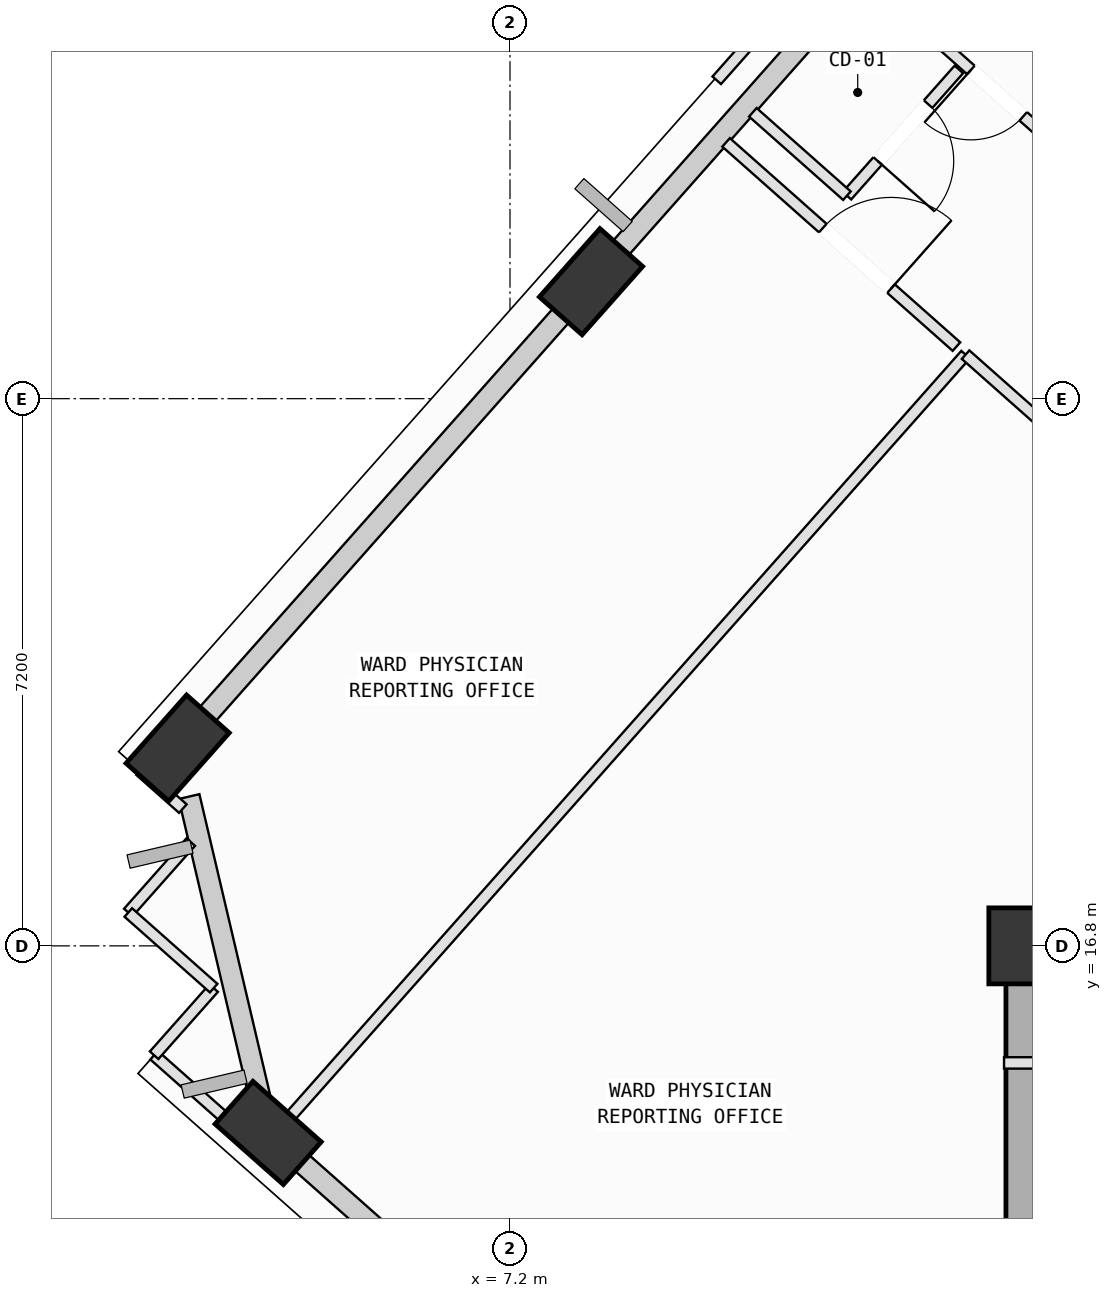
"""IFC4 building model, lengths in metres.
Left out: names, types, materials, properties, quantities, classifications, styles, units other than length and angle.
Written with IfcOpenShell. Run it as: python <this file> out.ifc"""

import sys

from ifc_helpers import new_model, si_unit, direction, frame, frame_2d, origin, origin_2d, place, context, subcontext, project, spatial, rectangle, extrude, element, fill, save


model = new_model("IFC4")
c1 = context("Model", 3, precision=1e-05, world=origin(), true_north=direction((0.0, 1.0)))
c2 = subcontext(c1, "Body", "Model", "MODEL_VIEW")
j1 = project(units=[si_unit("LENGTHUNIT", "METRE"), si_unit("PLANEANGLEUNIT", "RADIAN")], contexts=[c1])
p1 = place(None, origin())
s1 = spatial("IfcSite", under=j1, at=p1, CompositionType="ELEMENT")
p2 = place(p1, origin())
s2 = spatial("IfcBuilding", under=s1, at=p2, CompositionType="ELEMENT")
p3 = place(p2, frame((0.0, 0.0, 231.2)))
s3 = spatial("IfcBuildingStorey", under=s2, at=p3, CompositionType="ELEMENT", Elevation=231.2)
p4 = place(p3, frame((14.0, 16.8, 0.0), z_axis=(0.0, 0.0, 1.0), x_axis=(1.0, 0.0, 0.0)))
e1 = element("IfcColumn", 1, at=p4, inside=s3, PredefinedType="COLUMN", context=c2, shape_type="SweptSolid", body=[
    extrude(rectangle(XDim=1.0, YDim=1.0, at=origin_2d()), origin(), (0.0, 0.0, 1.0), 4.0),
])
p5 = place(p3, frame((8.266, 25.539, 0.002), z_axis=(-0.002187246162, -0.104441004248, 0.994528678614), x_axis=(0.678711632821, 0.73023191979, 0.078178403623)))
e2 = element("IfcColumn", 2, at=p5, inside=s3, PredefinedType="COLUMN", context=c2, shape_type="SweptSolid", body=[
    extrude(rectangle(XDim=1.2, YDim=0.75, at=origin_2d()), origin(), (0.0, 0.0, 1.0), 4.018),
])
p6 = place(p3, frame((2.827, 19.403, 0.002), z_axis=(0.023204107697, -0.126320011874, 0.991718117202), x_axis=(0.518268759348, 0.84979942688, 0.096116737138)))
e3 = element("IfcColumn", 3, at=p6, inside=s3, PredefinedType="COLUMN", context=c2, shape_type="SweptSolid", body=[
    extrude(rectangle(XDim=1.2, YDim=0.75, at=origin_2d()), origin(), (0.0, 0.0, 1.0), 4.03),
])
p7 = place(p3, frame((4.018, 14.339, 0.002), z_axis=(0.044042273811, -0.121222269459, 0.991647840468), x_axis=(-0.92799403017, 0.36264171227, 0.085545709951)))
e4 = element("IfcColumn", 4, at=p7, inside=s3, PredefinedType="COLUMN", context=c2, shape_type="SweptSolid", body=[
    extrude(rectangle(XDim=1.2, YDim=0.75, at=origin_2d()), origin(), (0.0, 0.0, 1.0), 4.03),
])
p8 = place(p3, frame((8.407, 25.699, 0.0), z_axis=(0.0, 0.0, 1.0), x_axis=(0.66326446151, 0.748385097458, 0.0)))
e5 = element("IfcWall", 5, at=p8, inside=s3, PredefinedType="SOLIDWALL", context=c2, shape_type="SweptSolid", body=[
    extrude(rectangle(XDim=7.434, YDim=0.28, at=frame_2d((3.717, 0.0))), origin(), (0.0, 0.0, 1.0), 3.265),
])
p9 = place(p3, frame((2.948, 19.539, 0.0), z_axis=(0.0, 0.0, 1.0), x_axis=(0.663273885077, 0.748376745614, 0.0)))
e6 = element("IfcWall", 6, at=p9, inside=s3, PredefinedType="SOLIDWALL", context=c2, shape_type="SweptSolid", body=[
    extrude(rectangle(XDim=7.485, YDim=0.28, at=frame_2d((3.742, 0.0))), origin(), (0.0, 0.0, 1.0), 3.265),
])
p10 = place(p3, frame((3.986, 14.473, 0.0), z_axis=(0.0, 0.0, 1.0), x_axis=(-0.228854104953, 0.973460732976, 0.0)))
e7 = element("IfcWall", 7, at=p10, inside=s3, PredefinedType="SOLIDWALL", context=c2, shape_type="SweptSolid", body=[
    extrude(rectangle(XDim=4.408, YDim=0.28, at=frame_2d((2.204, 0.0))), origin(), (0.0, 0.0, 1.0), 3.265),
])
p11 = place(p3, frame((8.835, 10.07, 0.0), z_axis=(0.0, 0.0, 1.0), x_axis=(-0.748388035146, 0.663261146797, 0.0)))
e8 = element("IfcWall", 8, at=p11, inside=s3, PredefinedType="SOLIDWALL", context=c2, shape_type="SweptSolid", body=[
    extrude(rectangle(XDim=5.831, YDim=0.28, at=frame_2d((2.915, 0.0))), origin(), (0.0, 0.0, 1.0), 3.265),
])
p12 = place(p11, frame((2.011, 0.0, 0.75)))
e9 = element("IfcOpeningElement", 9, at=p12, cuts=e8, PredefinedType="OPENING", context=c2, shape_type="SweptSolid", body=[
    extrude(rectangle(XDim=1.8, YDim=2.05, at=frame_2d((0.9, 1.025))), frame((0.0, 0.15, 0.0), z_axis=(0.0, -1.0, 0.0), x_axis=(1.0, 0.0, 0.0)), (0.0, 0.0, 1.0), 0.3),
])
p13 = place(p3, frame((14.0, 16.8, 0.0), z_axis=(0.0, 0.0, 1.0), x_axis=(0.0, -1.0, 0.0)))
e10 = element("IfcWall", 10, at=p13, inside=s3, PredefinedType="SHEAR", context=c2, shape_type="SweptSolid", body=[
    extrude(rectangle(XDim=9.0, YDim=0.55, at=frame_2d((4.5, 0.0))), origin(), (0.0, 0.0, 1.0), 3.78),
])
p14 = place(p3, frame((14.82, 15.26, 0.0), z_axis=(0.0, 0.0, 1.0), x_axis=(-1.0, 0.0, 0.0)))
e11 = element("IfcWall", 11, at=p14, inside=s3, PredefinedType="PARTITIONING", context=c2, shape_type="SweptSolid", body=[
    extrude(rectangle(XDim=1.12, YDim=0.15, at=frame_2d((0.56, 0.0))), origin(), (0.0, 0.0, 1.0), 3.78),
])
p15 = place(p3, frame((4.319, 13.764, 0.0), z_axis=(0.0, 0.0, 1.0), x_axis=(-0.748269298585, 0.663395098561, 0.0)))
e12 = element("IfcWall", 12, at=p15, inside=s3, PredefinedType="PARTITIONING", context=c2, shape_type="SweptSolid", body=[
    extrude(rectangle(XDim=0.532, YDim=0.15, at=frame_2d((0.266, 0.0))), origin(), (0.0, 0.0, 1.0), 3.265),
])
p16 = place(p3, frame((3.921, 14.117, 0.0), z_axis=(0.0, 0.0, 1.0), x_axis=(0.663304180291, 0.748349894374, 0.0)))
e13 = element("IfcWall", 13, at=p16, inside=s3, PredefinedType="PARTITIONING", context=c2, shape_type="SweptSolid", body=[
    extrude(rectangle(XDim=13.98, YDim=0.15, at=frame_2d((6.99, 0.0))), origin(), (0.0, 0.0, 1.0), 3.78),
])
p17 = place(p3, frame((13.194, 24.579, 0.0), z_axis=(0.0, 0.0, 1.0), x_axis=(0.748364755265, -0.663287413627, 0.0)))
e14 = element("IfcWall", 14, at=p17, inside=s3, PredefinedType="PARTITIONING", context=c2, shape_type="SweptSolid", body=[
    extrude(rectangle(XDim=6.029, YDim=0.15, at=frame_2d((3.015, 0.0))), origin(), (0.0, 0.0, 1.0), 3.78),
])
p18 = place(p17, frame((2.415, 0.0, 0.0)))
e15 = element("IfcOpeningElement", 15, at=p18, cuts=e14, PredefinedType="OPENING", context=c2, shape_type="SweptSolid", body=[
    extrude(rectangle(XDim=1.2, YDim=2.15, at=frame_2d((0.6, 1.075))), frame((0.0, 0.085, 0.0), z_axis=(0.0, -1.0, 0.0), x_axis=(1.0, 0.0, 0.0)), (0.0, 0.0, 1.0), 0.17),
])
p19 = place(p3, frame((2.178, 17.239, 0.0), z_axis=(0.0, 0.0, 1.0), x_axis=(0.663470520183, 0.748202425048, 0.0)))
e16 = element("IfcWall", 16, at=p19, inside=s3, PredefinedType="PARTITIONING", context=c2, shape_type="SweptSolid", body=[
    extrude(rectangle(XDim=1.239, YDim=0.15, at=frame_2d((0.62, 0.0))), origin(), (0.0, 0.0, 1.0), 3.78),
])
p20 = place(p3, frame((2.896, 18.606, 0.0), z_axis=(0.0, 0.0, 1.0), x_axis=(-0.747840076789, 0.663878919343, 0.0)))
e17 = element("IfcWall", 17, at=p20, inside=s3, PredefinedType="PARTITIONING", context=c2, shape_type="SweptSolid", body=[
    extrude(rectangle(XDim=0.75, YDim=0.15, at=frame_2d((0.375, 0.0))), origin(), (0.0, 0.0, 1.0), 3.78),
])
p21 = place(p3, frame((2.335, 19.104, 0.0), z_axis=(0.0, 0.0, 1.0), x_axis=(0.662768178269, 0.748824640269, 0.0)))
e18 = element("IfcWall", 18, at=p21, inside=s3, PredefinedType="PARTITIONING", context=c2, shape_type="SweptSolid", body=[
    extrude(rectangle(XDim=0.732, YDim=0.15, at=frame_2d((0.366, 0.0))), origin(), (0.0, 0.0, 1.0), 3.78),
])
p22 = place(p3, frame((7.785, 25.253, 0.0), z_axis=(0.0, 0.0, 1.0), x_axis=(0.66298290144, 0.748634538609, 0.0)))
e19 = element("IfcWall", 19, at=p22, inside=s3, PredefinedType="PARTITIONING", context=c2, shape_type="SweptSolid", body=[
    extrude(rectangle(XDim=0.747, YDim=0.15, at=frame_2d((0.374, 0.0))), origin(), (0.0, 0.0, 1.0), 3.78),
])
p23 = place(p3, frame((10.043, 27.372, 0.0), z_axis=(0.0, 0.0, 1.0), x_axis=(0.748293219075, -0.663368116725, 0.0)))
e20 = element("IfcWall", 20, at=p23, inside=s3, PredefinedType="PARTITIONING", context=c2, shape_type="SweptSolid", body=[
    extrude(rectangle(XDim=4.051, YDim=0.15, at=frame_2d((2.025, 0.0))), origin(), (0.0, 0.0, 1.0), 3.78),
])
p24 = place(p23, frame((1.7, 0.0, 0.0)))
e21 = element("IfcOpeningElement", 21, at=p24, cuts=e20, PredefinedType="OPENING", context=c2, shape_type="SweptSolid", body=[
    extrude(rectangle(XDim=1.2, YDim=2.15, at=frame_2d((0.6, 1.075))), frame((0.0, 0.085, 0.0), z_axis=(0.0, -1.0, 0.0), x_axis=(1.0, 0.0, 0.0)), (0.0, 0.0, 1.0), 0.17),
])
p25 = place(p3, frame((3.802, 14.223, 0.0), z_axis=(0.0, 0.0, 1.0), x_axis=(-0.748303596159, 0.66335641097, 0.0)))
e22 = element("IfcWall", 22, at=p25, inside=s3, PredefinedType="PARTITIONING", context=c2, shape_type="SweptSolid", body=[
    extrude(rectangle(XDim=1.716, YDim=0.15, at=frame_2d((0.858, 0.0))), origin(), (0.0, 0.0, 1.0), 3.78),
])
p26 = place(p3, frame((2.518, 15.361, 0.0), z_axis=(0.0, 0.0, 1.0), x_axis=(0.663528689518, 0.748150839194, 0.0)))
e23 = element("IfcWall", 23, at=p26, inside=s3, PredefinedType="PARTITIONING", context=c2, shape_type="SweptSolid", body=[
    extrude(rectangle(XDim=1.18, YDim=0.15, at=frame_2d((0.59, 0.0))), origin(), (0.0, 0.0, 1.0), 3.78),
])
p27 = place(p3, frame((3.301, 16.244, 0.0), z_axis=(0.0, 0.0, 1.0), x_axis=(-0.748449721944, 0.663191536227, 0.0)))
e24 = element("IfcWall", 24, at=p27, inside=s3, PredefinedType="PARTITIONING", context=c2, shape_type="SweptSolid", body=[
    extrude(rectangle(XDim=1.5, YDim=0.15, at=frame_2d((0.75, 0.0))), origin(), (0.0, 0.0, 1.0), 3.78),
])
p28 = place(p3, frame((15.283, 26.536, 0.0), z_axis=(0.0, 0.0, 1.0), x_axis=(-0.748380790805, 0.66326932083, 0.0)))
e25 = element("IfcWall", 25, at=p28, inside=s3, PredefinedType="PARTITIONING", context=c2, shape_type="SweptSolid", body=[
    extrude(rectangle(XDim=4.475, YDim=0.15, at=frame_2d((2.237, 0.0))), origin(), (0.0, 0.0, 1.0), 3.78),
])
p29 = place(p28, frame((1.778, 0.0, 0.0)))
e26 = element("IfcOpeningElement", 26, at=p29, cuts=e25, PredefinedType="OPENING", context=c2, shape_type="SweptSolid", body=[
    extrude(rectangle(XDim=0.92, YDim=2.1, at=frame_2d((0.46, 1.05))), frame((0.0, 0.085, 0.0), z_axis=(0.0, -1.0, 0.0), x_axis=(1.0, 0.0, 0.0)), (0.0, 0.0, 1.0), 0.17),
])
p30 = place(p3, frame((13.106, 28.332, 0.0), z_axis=(0.0, 0.0, 1.0), x_axis=(-0.663441871076, -0.748227828742, 0.0)))
e27 = element("IfcWall", 27, at=p30, inside=s3, PredefinedType="PARTITIONING", context=c2, shape_type="SweptSolid", body=[
    extrude(rectangle(XDim=2.22, YDim=0.15, at=frame_2d((1.11, 0.0))), origin(), (0.0, 0.0, 1.0), 3.78),
])
p31 = place(p30, frame((0.61, 0.0, 0.0)))
e28 = element("IfcOpeningElement", 28, at=p31, cuts=e27, PredefinedType="OPENING", context=c2, shape_type="SweptSolid", body=[
    extrude(rectangle(XDim=1.0, YDim=2.12, at=frame_2d((0.5, 1.06))), frame((0.0, 0.085, 0.0), z_axis=(0.0, -1.0, 0.0), x_axis=(1.0, 0.0, 0.0)), (0.0, 0.0, 1.0), 0.17),
])
p32 = place(p3, frame((11.633, 26.671, 0.0), z_axis=(0.0, 0.0, 1.0), x_axis=(-0.74840188068, 0.663245523916, 0.0)))
e29 = element("IfcWall", 29, at=p32, inside=s3, PredefinedType="PARTITIONING", context=c2, shape_type="SweptSolid", body=[
    extrude(rectangle(XDim=1.654, YDim=0.15, at=frame_2d((0.827, 0.0))), origin(), (0.0, 0.0, 1.0), 3.78),
])
p33 = place(p3, frame((9.92, 28.189, 0.0), z_axis=(0.0, 0.0, 1.0), x_axis=(0.663125550509, 0.748508185835, 0.0)))
e30 = element("IfcWall", 30, at=p33, inside=s3, PredefinedType="PARTITIONING", context=c2, shape_type="SweptSolid", body=[
    extrude(rectangle(XDim=5.67, YDim=0.15, at=frame_2d((2.835, 0.0))), origin(), (0.0, 0.0, 1.0), 3.78),
])
p34 = place(p24, origin())
e31 = element("IfcDoor", 31, at=p34, inside=s3, OperationType="SINGLE_SWING_RIGHT", PredefinedType="DOOR", context=c2, shape_type="SweptSolid", body=[
    extrude(rectangle(XDim=1.2, YDim=2.15, at=frame_2d((0.6, 1.075))), frame((0.0, 0.025, 0.0), z_axis=(0.0, -1.0, 0.0), x_axis=(1.0, 0.0, 0.0)), (0.0, 0.0, 1.0), 0.05),
])
fill(e21, e31)
p35 = place(p29, origin())
e32 = element("IfcDoor", 32, at=p35, inside=s3, OperationType="SINGLE_SWING_RIGHT", PredefinedType="DOOR", context=c2, shape_type="SweptSolid", body=[
    extrude(rectangle(XDim=0.92, YDim=2.1, at=frame_2d((0.46, 1.05))), frame((0.0, 0.025, 0.0), z_axis=(0.0, -1.0, 0.0), x_axis=(1.0, 0.0, 0.0)), (0.0, 0.0, 1.0), 0.05),
])
fill(e26, e32)
p36 = place(p31, origin())
e33 = element("IfcDoor", 33, at=p36, inside=s3, OperationType="SINGLE_SWING_RIGHT", PredefinedType="DOOR", context=c2, shape_type="SweptSolid", body=[
    extrude(rectangle(XDim=1.0, YDim=2.12, at=frame_2d((0.5, 1.06))), frame((0.0, 0.025, 0.0), z_axis=(0.0, -1.0, 0.0), x_axis=(1.0, 0.0, 0.0)), (0.0, 0.0, 1.0), 0.05),
])
fill(e28, e33)
save(model, sys.argv[1])
